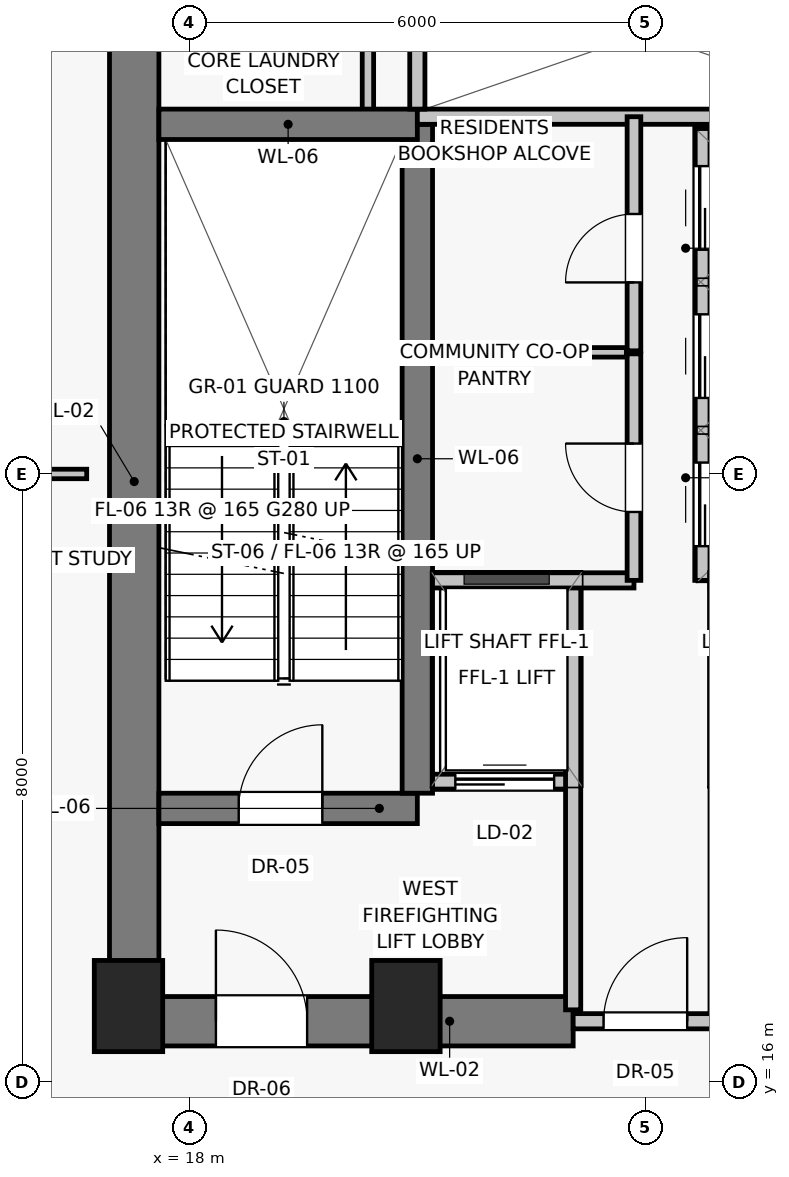
"""IFC4 building model, lengths in metres.
Left out: names, types, materials, properties, quantities, classifications, styles, units other than length and angle.
Written with IfcOpenShell. Run it as: python <this file> out.ifc"""

import sys

from ifc_helpers import new_model, si_unit, direction, frame, frame_2d, origin, origin_2d, place, context, subcontext, project, spatial, rectangle, extrude, source, transform, mapped, element, fill, save


model = new_model("IFC4")
c1 = context("Model", 3, precision=1e-05, world=origin(), true_north=direction((0.0, 1.0)))
c2 = subcontext(c1, "Body", "Model", "MODEL_VIEW")
j1 = project(units=[si_unit("LENGTHUNIT", "METRE"), si_unit("PLANEANGLEUNIT", "RADIAN")], contexts=[c1])
p1 = place(None, origin())
s1 = spatial("IfcSite", under=j1, at=p1, CompositionType="ELEMENT")
p2 = place(p1, origin())
s2 = spatial("IfcBuilding", under=s1, at=p2, CompositionType="ELEMENT")
p3 = place(p2, frame((0.0, 0.0, 158.75)))
s3 = spatial("IfcBuildingStorey", under=s2, at=p3, CompositionType="ELEMENT", Elevation=158.75)
for number, where, z_axis, x_axis in (
    (1, (17.2, 17.0, 0.0), (0.0, 0.0, 1.0), (1.0, 0.0, 0.0)),
    (2, (20.85, 17.0, 0.0), (0.0, 0.0, 1.0), (1.0, 0.0, 0.0)),
):
    element("IfcColumn", number, at=place(p3, frame(where, z_axis=z_axis, x_axis=x_axis)), inside=s3, PredefinedType="PILASTER", context=c2, shape_type="SweptSolid", body=[
        extrude(rectangle(XDim=0.9, YDim=1.2, at=origin_2d()), origin(), (0.0, 0.0, 1.0), 4.3),
    ])
p4 = place(p3, frame((17.275, 16.8, 0.0), z_axis=(0.0, 0.0, 1.0), x_axis=(0.0, 1.0, 0.0)))
e3 = element("IfcWall", 3, at=p4, inside=s3, PredefinedType="SHEAR", context=c2, shape_type="SweptSolid", body=[
    extrude(rectangle(XDim=14.2, YDim=0.65, at=frame_2d((7.1, 0.0))), origin(), (0.0, 0.0, 1.0), 4.05),
])
p5 = place(p3, frame((17.2, 16.8, 0.0), z_axis=(0.0, 0.0, 1.0), x_axis=(1.0, 0.0, 0.0)))
e4 = element("IfcWall", 4, at=p5, inside=s3, PredefinedType="SHEAR", context=c2, shape_type="SweptSolid", body=[
    extrude(rectangle(XDim=5.85, YDim=0.65, at=frame_2d((2.925, 0.0))), origin(), (0.0, 0.0, 1.0), 4.05),
])
p6 = place(p5, frame((1.15, 0.0, 0.0)))
e5 = element("IfcOpeningElement", 5, at=p6, cuts=e4, PredefinedType="OPENING", context=c2, shape_type="SweptSolid", body=[
    extrude(rectangle(XDim=1.2, YDim=2.03, at=frame_2d((0.6, 1.015))), frame((0.0, 0.335, 0.0), z_axis=(0.0, -1.0, 0.0), x_axis=(1.0, 0.0, 0.0)), (0.0, 0.0, 1.0), 0.67),
])
p7 = place(p3, frame((23.05, 16.8, 0.0), z_axis=(0.0, 0.0, 1.0), x_axis=(1.0, 0.0, 0.0)))
e6 = element("IfcWall", 6, at=p7, inside=s3, PredefinedType="SOLIDWALL", context=c2, shape_type="SweptSolid", body=[
    extrude(rectangle(XDim=1.9, YDim=0.2, at=frame_2d((0.95, 0.0))), origin(), (0.0, 0.0, 1.0), 3.2),
])
p8 = place(p7, frame((0.4, 0.0, 0.0)))
e7 = element("IfcOpeningElement", 7, at=p8, cuts=e6, PredefinedType="OPENING", context=c2, shape_type="SweptSolid", body=[
    extrude(rectangle(XDim=1.1, YDim=2.03, at=frame_2d((0.55, 1.015))), frame((0.0, 0.11, 0.0), z_axis=(0.0, -1.0, 0.0), x_axis=(1.0, 0.0, 0.0)), (0.0, 0.0, 1.0), 0.22),
])
p9 = place(p3, frame((20.35, 28.65, 0.0), z_axis=(0.0, 0.0, 1.0), x_axis=(0.0, 1.0, 0.0)))
e8 = element("IfcWall", 8, at=p9, inside=s3, PredefinedType="PARTITIONING", context=c2, shape_type="SweptSolid", body=[
    extrude(rectangle(XDim=2.2, YDim=0.15, at=frame_2d((1.1, 0.0))), origin(), (0.0, 0.0, 1.0), 4.05),
])
p10 = place(p3, frame((17.6, 19.6, 0.0), z_axis=(0.0, 0.0, 1.0), x_axis=(1.0, 0.0, 0.0)))
e9 = element("IfcWall", 9, at=p10, inside=s3, PredefinedType="SHEAR", context=c2, shape_type="SweptSolid", body=[
    extrude(rectangle(XDim=3.4, YDim=0.4, at=frame_2d((1.7, 0.0))), origin(), (0.0, 0.0, 1.0), 4.05),
])
p11 = place(p10, frame((1.05, 0.0, 0.0)))
e10 = element("IfcOpeningElement", 10, at=p11, cuts=e9, PredefinedType="OPENING", context=c2, shape_type="SweptSolid", body=[
    extrude(rectangle(XDim=1.1, YDim=2.03, at=frame_2d((0.55, 1.015))), frame((0.0, 0.21, 0.0), z_axis=(0.0, -1.0, 0.0), x_axis=(1.0, 0.0, 0.0)), (0.0, 0.0, 1.0), 0.42),
])
p12 = place(p3, frame((21.2, 19.95, 0.0), z_axis=(0.0, 0.0, 1.0), x_axis=(1.0, 0.0, 0.0)))
e11 = element("IfcWall", 11, at=p12, inside=s3, PredefinedType="SOLIDWALL", context=c2, shape_type="SweptSolid", body=[
    extrude(rectangle(XDim=1.85, YDim=0.2, at=frame_2d((0.925, 0.0))), origin(), (0.0, 0.0, 1.0), 4.05),
])
p13 = place(p12, frame((0.3, 0.0, 0.0)))
e12 = element("IfcOpeningElement", 12, at=p13, cuts=e11, PredefinedType="OPENING", context=c2, shape_type="SweptSolid", body=[
    extrude(rectangle(XDim=1.3, YDim=2.25, at=frame_2d((0.65, 1.125))), frame((0.0, 0.11, 0.0), z_axis=(0.0, -1.0, 0.0), x_axis=(1.0, 0.0, 0.0)), (0.0, 0.0, 1.0), 0.22),
])
p14 = place(p3, frame((21.0, 19.8, 0.0), z_axis=(0.0, 0.0, 1.0), x_axis=(0.0, 1.0, 0.0)))
e13 = element("IfcWall", 13, at=p14, inside=s3, PredefinedType="SHEAR", context=c2, shape_type="SweptSolid", body=[
    extrude(rectangle(XDim=8.8, YDim=0.4, at=frame_2d((4.4, 0.0))), origin(), (0.0, 0.0, 1.0), 4.05),
])
p15 = place(p3, frame((17.6, 28.6, 0.0), z_axis=(0.0, 0.0, 1.0), x_axis=(1.0, 0.0, 0.0)))
e14 = element("IfcWall", 14, at=p15, inside=s3, PredefinedType="SHEAR", context=c2, shape_type="SweptSolid", body=[
    extrude(rectangle(XDim=3.4, YDim=0.4, at=frame_2d((1.7, 0.0))), origin(), (0.0, 0.0, 1.0), 4.05),
])
for number, where, z_axis, x_axis in (
    (15, (23.05, 16.95, 0.0), (0.0, 0.0, 1.0), (0.0, 1.0, 0.0)),
    (16, (24.95, 16.95, 0.0), (0.0, 0.0, 1.0), (0.0, 1.0, 0.0)),
):
    element("IfcWall", number, at=place(p3, frame(where, z_axis=z_axis, x_axis=x_axis)), inside=s3, PredefinedType="SOLIDWALL", context=c2, shape_type="SweptSolid", body=[
        extrude(rectangle(XDim=5.6, YDim=0.2, at=frame_2d((2.8, 0.0))), origin(), (0.0, 0.0, 1.0), 4.05),
    ])
p16 = place(p3, frame((21.2, 22.6, 0.0), z_axis=(0.0, 0.0, 1.0), x_axis=(1.0, 0.0, 0.0)))
e17 = element("IfcWall", 17, at=p16, inside=s3, PredefinedType="SOLIDWALL", context=c2, shape_type="SweptSolid", body=[
    extrude(rectangle(XDim=2.65, YDim=0.2, at=frame_2d((1.325, 0.0))), origin(), (0.0, 0.0, 1.0), 4.05),
])
p17 = place(p3, frame((21.0, 28.7, 0.0), z_axis=(0.0, 0.0, 1.0), x_axis=(1.0, 0.0, 0.0)))
e18 = element("IfcWall", 18, at=p17, inside=s3, PredefinedType="SOLIDWALL", context=c2, shape_type="SweptSolid", body=[
    extrude(rectangle(XDim=6.0, YDim=0.2, at=frame_2d((3.0, 0.0))), origin(), (0.0, 0.0, 1.0), 4.05),
])
p18 = place(p3, frame((21.0, 28.8, 0.0), z_axis=(0.0, 0.0, 1.0), x_axis=(0.0, 1.0, 0.0)))
e19 = element("IfcWall", 19, at=p18, inside=s3, PredefinedType="SOLIDWALL", context=c2, shape_type="SweptSolid", body=[
    extrude(rectangle(XDim=1.6, YDim=0.2, at=frame_2d((0.8, 0.0))), origin(), (0.0, 0.0, 1.0), 4.05),
])
p19 = place(p3, frame((23.85, 22.6, 0.0), z_axis=(0.0, 0.0, 1.0), x_axis=(0.0, 1.0, 0.0)))
e20 = element("IfcWall", 20, at=p19, inside=s3, PredefinedType="PARTITIONING", context=c2, shape_type="SweptSolid", body=[
    extrude(rectangle(XDim=2.98, YDim=0.18, at=frame_2d((1.49, 0.0))), origin(), (0.0, 0.0, 1.0), 4.05),
])
p20 = place(p19, frame((0.9, 0.0, 0.0)))
e21 = element("IfcOpeningElement", 21, at=p20, cuts=e20, PredefinedType="OPENING", context=c2, shape_type="SweptSolid", body=[
    extrude(rectangle(XDim=0.9, YDim=2.01, at=frame_2d((0.45, 1.005))), frame((0.0, 0.1, 0.0), z_axis=(0.0, -1.0, 0.0), x_axis=(1.0, 0.0, 0.0)), (0.0, 0.0, 1.0), 0.2),
])
p21 = place(p3, frame((23.85, 25.62, 0.0), z_axis=(0.0, 0.0, 1.0), x_axis=(0.0, 1.0, 0.0)))
e22 = element("IfcWall", 22, at=p21, inside=s3, PredefinedType="PARTITIONING", context=c2, shape_type="SweptSolid", body=[
    extrude(rectangle(XDim=3.08, YDim=0.18, at=frame_2d((1.54, 0.0))), origin(), (0.0, 0.0, 1.0), 4.05),
])
p22 = place(p21, frame((0.9, 0.0, 0.0)))
e23 = element("IfcOpeningElement", 23, at=p22, cuts=e22, PredefinedType="OPENING", context=c2, shape_type="SweptSolid", body=[
    extrude(rectangle(XDim=0.9, YDim=2.01, at=frame_2d((0.45, 1.005))), frame((0.0, 0.1, 0.0), z_axis=(0.0, -1.0, 0.0), x_axis=(1.0, 0.0, 0.0)), (0.0, 0.0, 1.0), 0.2),
])
p23 = place(p3, frame((24.75, 22.6, 0.0), z_axis=(0.0, 0.0, 1.0), x_axis=(0.0, 1.0, 0.0)))
e24 = element("IfcWall", 24, at=p23, inside=s3, PredefinedType="SOLIDWALL", context=c2, shape_type="SweptSolid", body=[
    extrude(rectangle(XDim=5.95, YDim=0.2, at=frame_2d((2.975, 0.0))), origin(), (0.0, 0.0, 1.0), 4.05),
])
p24 = place(p23, frame((0.45, 0.0, 0.0)))
e25 = element("IfcOpeningElement", 25, at=p24, cuts=e24, PredefinedType="OPENING", context=c2, shape_type="SweptSolid", body=[
    extrude(rectangle(XDim=1.1, YDim=2.08, at=frame_2d((0.55, 1.04))), frame((0.0, 0.11, 0.0), z_axis=(0.0, -1.0, 0.0), x_axis=(1.0, 0.0, 0.0)), (0.0, 0.0, 1.0), 0.22),
])
p25 = place(p23, frame((2.4, 0.0, 0.0)))
e26 = element("IfcOpeningElement", 26, at=p25, cuts=e24, PredefinedType="OPENING", context=c2, shape_type="SweptSolid", body=[
    extrude(rectangle(XDim=1.1, YDim=2.08, at=frame_2d((0.55, 1.04))), frame((0.0, 0.11, 0.0), z_axis=(0.0, -1.0, 0.0), x_axis=(1.0, 0.0, 0.0)), (0.0, 0.0, 1.0), 0.22),
])
p26 = place(p23, frame((4.35, 0.0, 0.0)))
e27 = element("IfcOpeningElement", 27, at=p26, cuts=e24, PredefinedType="OPENING", context=c2, shape_type="SweptSolid", body=[
    extrude(rectangle(XDim=1.1, YDim=2.08, at=frame_2d((0.55, 1.04))), frame((0.0, 0.11, 0.0), z_axis=(0.0, -1.0, 0.0), x_axis=(1.0, 0.0, 0.0)), (0.0, 0.0, 1.0), 0.22),
])
p27 = place(p3, frame((21.35, 25.6, 0.0), z_axis=(0.0, 0.0, 1.0), x_axis=(1.0, 0.0, 0.0)))
e28 = element("IfcWall", 28, at=p27, inside=s3, PredefinedType="PARTITIONING", context=c2, shape_type="SweptSolid", body=[
    extrude(rectangle(XDim=2.4, YDim=0.125, at=frame_2d((1.2, 0.0))), origin(), (0.0, 0.0, 1.0), 4.05),
])
p28 = place(p3, frame((14.55, 24.0, 0.0), z_axis=(0.0, 0.0, 1.0), x_axis=(1.0, 0.0, 0.0)))
e29 = element("IfcWall", 29, at=p28, inside=s3, PredefinedType="PARTITIONING", context=c2, shape_type="SweptSolid", body=[
    extrude(rectangle(XDim=2.1, YDim=0.125, at=frame_2d((1.05, 0.0))), origin(), (0.0, 0.0, 1.0), 4.05),
])
m1 = source(origin(), c2, "Body", "SweptSolid", [
    extrude(rectangle(XDim=1.2, YDim=2.03, at=frame_2d((0.6, 1.015))), frame((0.0, 0.025, 0.0), z_axis=(0.0, -1.0, 0.0), x_axis=(1.0, 0.0, 0.0)), (0.0, 0.0, 1.0), 0.05),
])
p29 = place(p6, origin())
e30 = element("IfcDoor", 30, at=p29, inside=s3, OperationType="SINGLE_SWING_LEFT", PredefinedType="DOOR", context=c2, shape_type="MappedRepresentation", body=[
    mapped(m1, transform((0.0, 0.0, 0.0), scale=1.0)),
])
fill(e5, e30)
m2 = source(origin(), c2, "Body", "SweptSolid", [
    extrude(rectangle(XDim=1.1, YDim=2.03, at=frame_2d((0.55, 1.015))), frame((0.0, 0.025, 0.0), z_axis=(0.0, -1.0, 0.0), x_axis=(1.0, 0.0, 0.0)), (0.0, 0.0, 1.0), 0.05),
])
p30 = place(p8, origin())
e31 = element("IfcDoor", 31, at=p30, inside=s3, OperationType="SINGLE_SWING_RIGHT", PredefinedType="DOOR", context=c2, shape_type="MappedRepresentation", body=[
    mapped(m2, transform((0.0, 0.0, 0.0), scale=1.0)),
])
fill(e7, e31)
p31 = place(p11, origin())
e32 = element("IfcDoor", 32, at=p31, inside=s3, OperationType="SINGLE_SWING_RIGHT", PredefinedType="DOOR", context=c2, shape_type="MappedRepresentation", body=[
    mapped(m2, transform((0.0, 0.0, 0.0), scale=1.0)),
])
fill(e10, e32)
m3 = source(origin(), c2, "Body", "SweptSolid", [
    extrude(rectangle(XDim=1.3, YDim=2.25, at=frame_2d((0.65, 1.125))), frame((0.0, 0.025, 0.0), z_axis=(0.0, -1.0, 0.0), x_axis=(1.0, 0.0, 0.0)), (0.0, 0.0, 1.0), 0.05),
])
p32 = place(p13, origin())
e33 = element("IfcDoor", 33, at=p32, inside=s3, OperationType="SLIDING_TO_LEFT", PredefinedType="DOOR", context=c2, shape_type="MappedRepresentation", body=[
    mapped(m3, transform((0.0, 0.0, 0.0), scale=1.0)),
])
fill(e12, e33)
m4 = source(origin(), c2, "Body", "SweptSolid", [
    extrude(rectangle(XDim=0.9, YDim=2.01, at=frame_2d((0.45, 1.005))), frame((0.0, 0.025, 0.0), z_axis=(0.0, -1.0, 0.0), x_axis=(1.0, 0.0, 0.0)), (0.0, 0.0, 1.0), 0.05),
])
p33 = place(p20, origin())
e34 = element("IfcDoor", 34, at=p33, inside=s3, OperationType="SINGLE_SWING_RIGHT", PredefinedType="DOOR", context=c2, shape_type="MappedRepresentation", body=[
    mapped(m4, transform((0.0, 0.0, 0.0), scale=1.0)),
])
fill(e21, e34)
p34 = place(p22, origin())
e35 = element("IfcDoor", 35, at=p34, inside=s3, OperationType="SINGLE_SWING_LEFT", PredefinedType="DOOR", context=c2, shape_type="MappedRepresentation", body=[
    mapped(m4, transform((0.0, 0.0, 0.0), scale=1.0)),
])
fill(e23, e35)
m5 = source(origin(), c2, "Body", "SweptSolid", [
    extrude(rectangle(XDim=1.1, YDim=2.08, at=frame_2d((0.55, 1.04))), frame((0.0, 0.025, 0.0), z_axis=(0.0, -1.0, 0.0), x_axis=(1.0, 0.0, 0.0)), (0.0, 0.0, 1.0), 0.05),
])
p35 = place(p24, origin())
e36 = element("IfcDoor", 36, at=p35, inside=s3, OperationType="SLIDING_TO_LEFT", PredefinedType="DOOR", context=c2, shape_type="MappedRepresentation", body=[
    mapped(m5, transform((0.0, 0.0, 0.0), scale=1.0)),
])
fill(e25, e36)
p36 = place(p25, origin())
e37 = element("IfcDoor", 37, at=p36, inside=s3, OperationType="SLIDING_TO_LEFT", PredefinedType="DOOR", context=c2, shape_type="MappedRepresentation", body=[
    mapped(m5, transform((0.0, 0.0, 0.0), scale=1.0)),
])
fill(e26, e37)
p37 = place(p26, origin())
e38 = element("IfcDoor", 38, at=p37, inside=s3, OperationType="SLIDING_TO_LEFT", PredefinedType="DOOR", context=c2, shape_type="MappedRepresentation", body=[
    mapped(m5, transform((0.0, 0.0, 0.0), scale=1.0)),
])
fill(e27, e38)
save(model, sys.argv[1])
